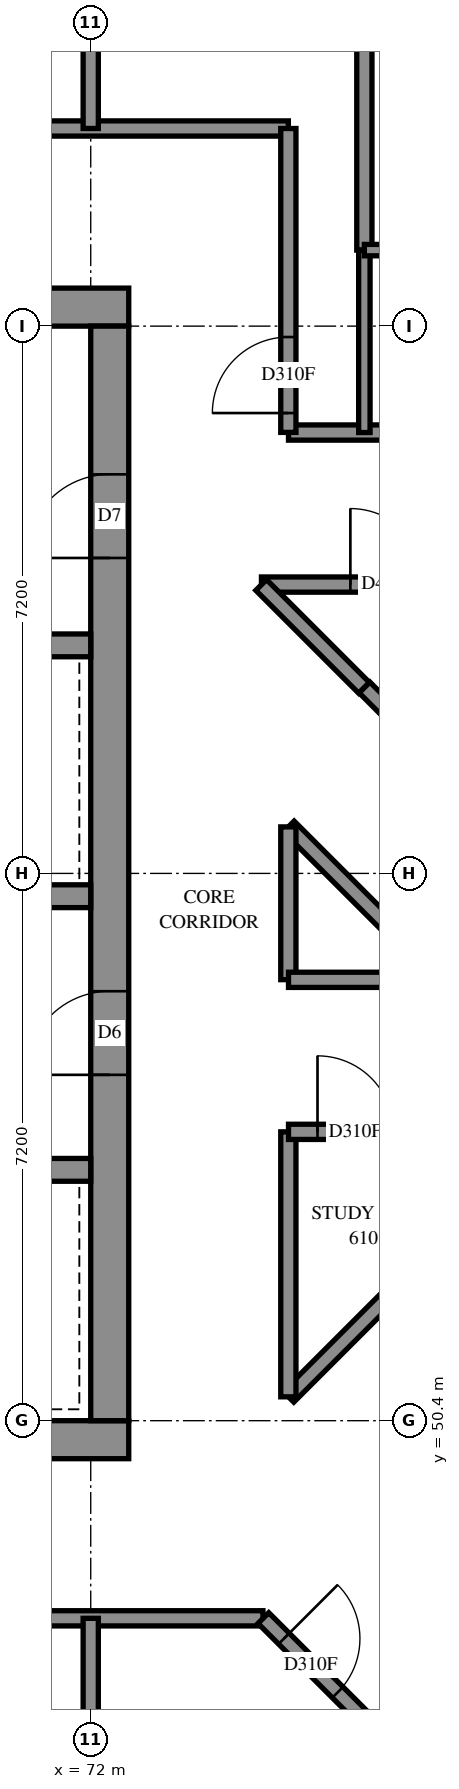
"""IFC4 building model, lengths in metres.
Left out: names, types, materials, properties, quantities, classifications, styles, units other than length and angle.
Written with IfcOpenShell. Run it as: python <this file> out.ifc"""

import sys

from ifc_helpers import new_model, si_unit, direction, frame, frame_2d, origin, place, context, subcontext, project, spatial, rectangle, extrude, element, fill, save


model = new_model("IFC4")
c1 = context("Model", 3, precision=1e-05, world=origin(), true_north=direction((0.0, 1.0)))
c2 = subcontext(c1, "Body", "Model", "MODEL_VIEW")
j1 = project(units=[si_unit("LENGTHUNIT", "METRE"), si_unit("PLANEANGLEUNIT", "RADIAN")], contexts=[c1])
p1 = place(None, origin())
s1 = spatial("IfcSite", under=j1, at=p1, CompositionType="ELEMENT")
p2 = place(p1, origin())
s2 = spatial("IfcBuilding", under=s1, at=p2, CompositionType="ELEMENT")
p3 = place(p2, frame((0.0, 0.0, 223.6)))
s3 = spatial("IfcBuildingStorey", under=s2, at=p3, CompositionType="ELEMENT", Elevation=223.6)
p4 = place(p3, frame((57.1, 50.15, -0.3), z_axis=(0.0, 0.0, 1.0), x_axis=(1.0, 0.0, 0.0)))
e1 = element("IfcWall", 1, at=p4, inside=s3, PredefinedType="SHEAR", context=c2, shape_type="SweptSolid", body=[
    extrude(rectangle(XDim=15.4, YDim=0.5, at=frame_2d((7.7, 0.0))), origin(), (0.0, 0.0, 1.0), 2.7),
])
p5 = place(p3, frame((57.1, 65.05, -0.3), z_axis=(0.0, 0.0, 1.0), x_axis=(1.0, 0.0, 0.0)))
e2 = element("IfcWall", 2, at=p5, inside=s3, PredefinedType="SHEAR", context=c2, shape_type="SweptSolid", body=[
    extrude(rectangle(XDim=15.4, YDim=0.5, at=frame_2d((7.7, 0.0))), origin(), (0.0, 0.0, 1.0), 2.7),
])
p6 = place(p5, frame((10.5, 0.0, 0.3)))
e3 = element("IfcOpeningElement", 3, at=p6, cuts=e2, PredefinedType="OPENING", context=c2, shape_type="SweptSolid", body=[
    extrude(rectangle(XDim=0.8, YDim=2.1, at=frame_2d((0.4, 1.05))), frame((0.0, 0.26, 0.0), z_axis=(0.0, -1.0, 0.0), x_axis=(1.0, 0.0, 0.0)), (0.0, 0.0, 1.0), 0.52),
])
p7 = place(p3, frame((72.25, 50.4, -0.3), z_axis=(0.0, 0.0, 1.0), x_axis=(0.0, 1.0, 0.0)))
e4 = element("IfcWall", 4, at=p7, inside=s3, PredefinedType="SHEAR", context=c2, shape_type="SweptSolid", body=[
    extrude(rectangle(XDim=14.4, YDim=0.5, at=frame_2d((7.2, 0.0))), origin(), (0.0, 0.0, 1.0), 2.7),
])
p8 = place(p7, frame((4.55, 0.0, 0.3)))
e5 = element("IfcOpeningElement", 5, at=p8, cuts=e4, PredefinedType="OPENING", context=c2, shape_type="SweptSolid", body=[
    extrude(rectangle(XDim=1.1, YDim=2.1, at=frame_2d((0.55, 1.05))), frame((0.0, 0.26, 0.0), z_axis=(0.0, -1.0, 0.0), x_axis=(1.0, 0.0, 0.0)), (0.0, 0.0, 1.0), 0.52),
])
p9 = place(p7, frame((11.35, 0.0, 0.3)))
e6 = element("IfcOpeningElement", 6, at=p9, cuts=e4, PredefinedType="OPENING", context=c2, shape_type="SweptSolid", body=[
    extrude(rectangle(XDim=1.1, YDim=2.1, at=frame_2d((0.55, 1.05))), frame((0.0, 0.26, 0.0), z_axis=(0.0, -1.0, 0.0), x_axis=(1.0, 0.0, 0.0)), (0.0, 0.0, 1.0), 0.52),
])
p10 = place(p3, frame((57.6, 53.7, 0.0), z_axis=(0.0, 0.0, 1.0), x_axis=(1.0, 0.0, 0.0)))
e7 = element("IfcWall", 7, at=p10, inside=s3, PredefinedType="SOLIDWALL", context=c2, shape_type="SweptSolid", body=[
    extrude(rectangle(XDim=14.4, YDim=0.3, at=frame_2d((7.2, 0.0))), origin(), (0.0, 0.0, 1.0), 3.1),
])
p11 = place(p10, frame((1.35, 0.0, 0.0)))
e8 = element("IfcOpeningElement", 8, at=p11, cuts=e7, PredefinedType="OPENING", context=c2, shape_type="SweptSolid", body=[
    extrude(rectangle(XDim=0.9, YDim=2.1, at=frame_2d((0.45, 1.05))), frame((0.0, 0.16, 0.0), z_axis=(0.0, -1.0, 0.0), x_axis=(1.0, 0.0, 0.0)), (0.0, 0.0, 1.0), 0.32),
])
p12 = place(p10, frame((4.95, 0.0, 0.0)))
e9 = element("IfcOpeningElement", 9, at=p12, cuts=e7, PredefinedType="OPENING", context=c2, shape_type="SweptSolid", body=[
    extrude(rectangle(XDim=0.9, YDim=2.1, at=frame_2d((0.45, 1.05))), frame((0.0, 0.16, 0.0), z_axis=(0.0, -1.0, 0.0), x_axis=(1.0, 0.0, 0.0)), (0.0, 0.0, 1.0), 0.32),
])
p13 = place(p10, frame((8.55, 0.0, 0.0)))
e10 = element("IfcOpeningElement", 10, at=p13, cuts=e7, PredefinedType="OPENING", context=c2, shape_type="SweptSolid", body=[
    extrude(rectangle(XDim=0.9, YDim=2.1, at=frame_2d((0.45, 1.05))), frame((0.0, 0.16, 0.0), z_axis=(0.0, -1.0, 0.0), x_axis=(1.0, 0.0, 0.0)), (0.0, 0.0, 1.0), 0.32),
])
p14 = place(p10, frame((12.05, 0.0, 0.0)))
e11 = element("IfcOpeningElement", 11, at=p14, cuts=e7, PredefinedType="OPENING", context=c2, shape_type="SweptSolid", body=[
    extrude(rectangle(XDim=1.1, YDim=2.1, at=frame_2d((0.55, 1.05))), frame((0.0, 0.16, 0.0), z_axis=(0.0, -1.0, 0.0), x_axis=(1.0, 0.0, 0.0)), (0.0, 0.0, 1.0), 0.32),
])
p15 = place(p3, frame((57.6, 57.3, 0.0), z_axis=(0.0, 0.0, 1.0), x_axis=(1.0, 0.0, 0.0)))
e12 = element("IfcWall", 12, at=p15, inside=s3, PredefinedType="SOLIDWALL", context=c2, shape_type="SweptSolid", body=[
    extrude(rectangle(XDim=14.4, YDim=0.3, at=frame_2d((7.2, 0.0))), origin(), (0.0, 0.0, 1.0), 3.1),
])
p16 = place(p15, frame((1.25, 0.0, 0.0)))
e13 = element("IfcOpeningElement", 13, at=p16, cuts=e12, PredefinedType="OPENING", context=c2, shape_type="SweptSolid", body=[
    extrude(rectangle(XDim=1.1, YDim=2.1, at=frame_2d((0.55, 1.05))), frame((0.0, 0.16, 0.0), z_axis=(0.0, -1.0, 0.0), x_axis=(1.0, 0.0, 0.0)), (0.0, 0.0, 1.0), 0.32),
])
p17 = place(p15, frame((4.85, 0.0, 0.0)))
e14 = element("IfcOpeningElement", 14, at=p17, cuts=e12, PredefinedType="OPENING", context=c2, shape_type="SweptSolid", body=[
    extrude(rectangle(XDim=1.1, YDim=2.1, at=frame_2d((0.55, 1.05))), frame((0.0, 0.16, 0.0), z_axis=(0.0, -1.0, 0.0), x_axis=(1.0, 0.0, 0.0)), (0.0, 0.0, 1.0), 0.32),
])
p18 = place(p15, frame((8.45, 0.0, 0.0)))
e15 = element("IfcOpeningElement", 15, at=p18, cuts=e12, PredefinedType="OPENING", context=c2, shape_type="SweptSolid", body=[
    extrude(rectangle(XDim=1.1, YDim=2.1, at=frame_2d((0.55, 1.05))), frame((0.0, 0.16, 0.0), z_axis=(0.0, -1.0, 0.0), x_axis=(1.0, 0.0, 0.0)), (0.0, 0.0, 1.0), 0.32),
])
p19 = place(p15, frame((12.05, 0.0, 0.0)))
e16 = element("IfcOpeningElement", 16, at=p19, cuts=e12, PredefinedType="OPENING", context=c2, shape_type="SweptSolid", body=[
    extrude(rectangle(XDim=1.1, YDim=2.1, at=frame_2d((0.55, 1.05))), frame((0.0, 0.16, 0.0), z_axis=(0.0, -1.0, 0.0), x_axis=(1.0, 0.0, 0.0)), (0.0, 0.0, 1.0), 0.32),
])
p20 = place(p3, frame((64.8, 60.6, 0.0), z_axis=(0.0, 0.0, 1.0), x_axis=(1.0, 0.0, 0.0)))
e17 = element("IfcWall", 17, at=p20, inside=s3, PredefinedType="SOLIDWALL", context=c2, shape_type="SweptSolid", body=[
    extrude(rectangle(XDim=7.2, YDim=0.3, at=frame_2d((3.6, 0.0))), origin(), (0.0, 0.0, 1.0), 3.1),
])
p21 = place(p3, frame((55.0, 67.4, 0.0), z_axis=(0.0, 0.0, 1.0), x_axis=(1.0, 0.0, 0.0)))
e18 = element("IfcWall", 18, at=p21, inside=s3, PredefinedType="PARTITIONING", context=c2, shape_type="SweptSolid", body=[
    extrude(rectangle(XDim=19.6, YDim=0.2, at=frame_2d((9.8, 0.0))), origin(), (0.0, 0.0, 1.0), 3.1),
])
p22 = place(p21, frame((4.9, 0.0, 0.0)))
e19 = element("IfcOpeningElement", 19, at=p22, cuts=e18, PredefinedType="OPENING", context=c2, shape_type="SweptSolid", body=[
    extrude(rectangle(XDim=0.9, YDim=2.1, at=frame_2d((0.45, 1.05))), frame((0.0, 0.11, 0.0), z_axis=(0.0, -1.0, 0.0), x_axis=(1.0, 0.0, 0.0)), (0.0, 0.0, 1.0), 0.22),
])
p23 = place(p21, frame((6.6, 0.0, 0.0)))
e20 = element("IfcOpeningElement", 20, at=p23, cuts=e18, PredefinedType="OPENING", context=c2, shape_type="SweptSolid", body=[
    extrude(rectangle(XDim=0.9, YDim=2.1, at=frame_2d((0.45, 1.05))), frame((0.0, 0.11, 0.0), z_axis=(0.0, -1.0, 0.0), x_axis=(1.0, 0.0, 0.0)), (0.0, 0.0, 1.0), 0.22),
])
p24 = place(p21, frame((14.001, 0.0, 0.0)))
e21 = element("IfcOpeningElement", 21, at=p24, cuts=e18, PredefinedType="OPENING", context=c2, shape_type="SweptSolid", body=[
    extrude(rectangle(XDim=0.9, YDim=2.1, at=frame_2d((0.45, 1.05))), frame((0.0, 0.11, 0.0), z_axis=(0.0, -1.0, 0.0), x_axis=(1.0, 0.0, 0.0)), (0.0, 0.0, 1.0), 0.22),
])
p25 = place(p3, frame((55.0, 47.8, 0.0), z_axis=(0.0, 0.0, 1.0), x_axis=(1.0, 0.0, 0.0)))
e22 = element("IfcWall", 22, at=p25, inside=s3, PredefinedType="PARTITIONING", context=c2, shape_type="SweptSolid", body=[
    extrude(rectangle(XDim=19.266, YDim=0.2, at=frame_2d((9.633, 0.0))), origin(), (0.0, 0.0, 1.0), 3.1),
])
p26 = place(p25, frame((4.9, 0.0, 0.0)))
e23 = element("IfcOpeningElement", 23, at=p26, cuts=e22, PredefinedType="OPENING", context=c2, shape_type="SweptSolid", body=[
    extrude(rectangle(XDim=0.9, YDim=2.1, at=frame_2d((0.45, 1.05))), frame((0.0, 0.11, 0.0), z_axis=(0.0, -1.0, 0.0), x_axis=(1.0, 0.0, 0.0)), (0.0, 0.0, 1.0), 0.22),
])
p27 = place(p25, frame((6.6, 0.0, 0.0)))
e24 = element("IfcOpeningElement", 24, at=p27, cuts=e22, PredefinedType="OPENING", context=c2, shape_type="SweptSolid", body=[
    extrude(rectangle(XDim=0.9, YDim=2.1, at=frame_2d((0.45, 1.05))), frame((0.0, 0.11, 0.0), z_axis=(0.0, -1.0, 0.0), x_axis=(1.0, 0.0, 0.0)), (0.0, 0.0, 1.0), 0.22),
])
p28 = place(p25, frame((13.661, 0.0, 0.0)))
e25 = element("IfcOpeningElement", 25, at=p28, cuts=e22, PredefinedType="OPENING", context=c2, shape_type="SweptSolid", body=[
    extrude(rectangle(XDim=0.9, YDim=2.1, at=frame_2d((0.45, 1.05))), frame((0.0, 0.11, 0.0), z_axis=(0.0, -1.0, 0.0), x_axis=(1.0, 0.0, 0.0)), (0.0, 0.0, 1.0), 0.22),
])
p29 = place(p3, frame((75.6, 65.8, 0.0), z_axis=(0.0, 0.0, 1.0), x_axis=(0.0, 1.0, 0.0)))
e26 = element("IfcWall", 26, at=p29, inside=s3, PredefinedType="PARTITIONING", context=c2, shape_type="SweptSolid", body=[
    extrude(rectangle(XDim=7.012, YDim=0.2, at=frame_2d((3.506, 0.0))), origin(), (0.0, 0.0, 1.0), 3.1),
])
p30 = place(p3, frame((74.246, 61.4, 0.0), z_axis=(0.0, 0.0, 1.0), x_axis=(1.0, 0.0, 0.0)))
e27 = element("IfcWall", 27, at=p30, inside=s3, PredefinedType="PARTITIONING", context=c2, shape_type="SweptSolid", body=[
    extrude(rectangle(XDim=4.954, YDim=0.2, at=frame_2d((2.477, 0.0))), origin(), (0.0, 0.0, 1.0), 3.1),
])
p31 = place(p30, frame((1.17, 0.0, 0.0)))
e28 = element("IfcOpeningElement", 28, at=p31, cuts=e27, PredefinedType="OPENING", context=c2, shape_type="SweptSolid", body=[
    extrude(rectangle(XDim=1.0, YDim=2.1, at=frame_2d((0.5, 1.05))), frame((0.0, 0.11, 0.0), z_axis=(0.0, -1.0, 0.0), x_axis=(1.0, 0.0, 0.0)), (0.0, 0.0, 1.0), 0.22),
])
p32 = place(p3, frame((74.601, 50.715, 0.0), z_axis=(0.0, 0.0, 1.0), x_axis=(0.7071067812, 0.7071067812, 0.0)))
e29 = element("IfcWall", 29, at=p32, inside=s3, PredefinedType="PARTITIONING", context=c2, shape_type="SweptSolid", body=[
    extrude(rectangle(XDim=4.927, YDim=0.2, at=frame_2d((2.464, 0.0))), origin(), (0.0, 0.0, 1.0), 3.1),
])
p33 = place(p3, frame((74.272, 47.803, 0.0), z_axis=(0.0, 0.0, 1.0), x_axis=(0.7071067812, -0.7071067812, 0.0)))
e30 = element("IfcWall", 30, at=p33, inside=s3, PredefinedType="PARTITIONING", context=c2, shape_type="SweptSolid", body=[
    extrude(rectangle(XDim=4.641, YDim=0.2, at=frame_2d((2.321, 0.0))), origin(), (0.0, 0.0, 1.0), 3.1),
])
p34 = place(p33, frame((0.382, 0.0, 0.0)))
e31 = element("IfcOpeningElement", 31, at=p34, cuts=e30, PredefinedType="OPENING", context=c2, shape_type="SweptSolid", body=[
    extrude(rectangle(XDim=1.0, YDim=2.1, at=frame_2d((0.5, 1.05))), frame((0.0, 0.11, 0.0), z_axis=(0.0, -1.0, 0.0), x_axis=(1.0, 0.0, 0.0)), (0.0, 0.0, 1.0), 0.22),
])
p35 = place(p3, frame((74.602, 63.4, 0.0), z_axis=(0.0, 0.0, 1.0), x_axis=(1.0, 0.0, 0.0)))
e32 = element("IfcWall", 32, at=p35, inside=s3, PredefinedType="PARTITIONING", context=c2, shape_type="SweptSolid", body=[
    extrude(rectangle(XDim=4.598, YDim=0.2, at=frame_2d((2.299, 0.0))), origin(), (0.0, 0.0, 1.0), 3.1),
])
p36 = place(p35, frame((3.298, 0.0, 0.0)))
e33 = element("IfcOpeningElement", 33, at=p36, cuts=e32, PredefinedType="OPENING", context=c2, shape_type="SweptSolid", body=[
    extrude(rectangle(XDim=0.9, YDim=2.1, at=frame_2d((0.45, 1.05))), frame((0.0, 0.11, 0.0), z_axis=(0.0, -1.0, 0.0), x_axis=(1.0, 0.0, 0.0)), (0.0, 0.0, 1.0), 0.22),
])
p37 = place(p3, frame((72.0, 43.6, 0.0), z_axis=(0.0, 0.0, 1.0), x_axis=(0.0, 1.0, 0.0)))
e34 = element("IfcWall", 34, at=p37, inside=s3, PredefinedType="PARTITIONING", context=c2, shape_type="SweptSolid", body=[
    extrude(rectangle(XDim=4.2, YDim=0.2, at=frame_2d((2.1, 0.0))), origin(), (0.0, 0.0, 1.0), 3.1),
])
p38 = place(p3, frame((72.0, 67.4, 0.0), z_axis=(0.0, 0.0, 1.0), x_axis=(0.0, 1.0, 0.0)))
e35 = element("IfcWall", 35, at=p38, inside=s3, PredefinedType="PARTITIONING", context=c2, shape_type="SweptSolid", body=[
    extrude(rectangle(XDim=4.096, YDim=0.2, at=frame_2d((2.048, 0.0))), origin(), (0.0, 0.0, 1.0), 3.1),
])
p39 = place(p3, frame((74.6, 63.402, 0.0), z_axis=(0.0, 0.0, 1.0), x_axis=(0.0, 1.0, 0.0)))
e36 = element("IfcWall", 36, at=p39, inside=s3, PredefinedType="PARTITIONING", context=c2, shape_type="SweptSolid", body=[
    extrude(rectangle(XDim=3.998, YDim=0.2, at=frame_2d((1.999, 0.0))), origin(), (0.0, 0.0, 1.0), 3.1),
])
p40 = place(p39, frame((0.255, 0.0, 0.0)))
e37 = element("IfcOpeningElement", 37, at=p40, cuts=e36, PredefinedType="OPENING", context=c2, shape_type="SweptSolid", body=[
    extrude(rectangle(XDim=1.0, YDim=2.1, at=frame_2d((0.5, 1.05))), frame((0.0, 0.11, 0.0), z_axis=(0.0, -1.0, 0.0), x_axis=(1.0, 0.0, 0.0)), (0.0, 0.0, 1.0), 0.22),
])
p41 = place(p3, frame((74.6, 50.714, 0.0), z_axis=(0.0, 0.0, 1.0), x_axis=(0.0, 1.0, 0.0)))
e38 = element("IfcWall", 38, at=p41, inside=s3, PredefinedType="PARTITIONING", context=c2, shape_type="SweptSolid", body=[
    extrude(rectangle(XDim=3.486, YDim=0.2, at=frame_2d((1.743, 0.0))), origin(), (0.0, 0.0, 1.0), 3.1),
])
p42 = place(p3, frame((74.602, 54.2, 0.0), z_axis=(0.0, 0.0, 1.0), x_axis=(1.0, 0.0, 0.0)))
e39 = element("IfcWall", 39, at=p42, inside=s3, PredefinedType="PARTITIONING", context=c2, shape_type="SweptSolid", body=[
    extrude(rectangle(XDim=3.484, YDim=0.2, at=frame_2d((1.742, 0.0))), origin(), (0.0, 0.0, 1.0), 3.1),
])
p43 = place(p42, frame((0.382, 0.0, 0.0)))
e40 = element("IfcOpeningElement", 40, at=p43, cuts=e39, PredefinedType="OPENING", context=c2, shape_type="SweptSolid", body=[
    extrude(rectangle(XDim=1.0, YDim=2.1, at=frame_2d((0.5, 1.05))), frame((0.0, 0.11, 0.0), z_axis=(0.0, -1.0, 0.0), x_axis=(1.0, 0.0, 0.0)), (0.0, 0.0, 1.0), 0.22),
])
p44 = place(p3, frame((74.606, 58.218, 0.0), z_axis=(0.0, 0.0, 1.0), x_axis=(0.7071067812, -0.7071067812, 0.0)))
e41 = element("IfcWall", 41, at=p44, inside=s3, PredefinedType="PARTITIONING", context=c2, shape_type="SweptSolid", body=[
    extrude(rectangle(XDim=2.845, YDim=0.2, at=frame_2d((1.423, 0.0))), origin(), (0.0, 0.0, 1.0), 3.1),
])
p45 = place(p3, frame((75.6, 63.4, 0.0), z_axis=(0.0, 0.0, 1.0), x_axis=(0.0, 1.0, 0.0)))
e42 = element("IfcWall", 42, at=p45, inside=s3, PredefinedType="PARTITIONING", context=c2, shape_type="SweptSolid", body=[
    extrude(rectangle(XDim=2.4, YDim=0.15, at=frame_2d((1.2, 0.0))), origin(), (0.0, 0.0, 1.0), 3.1),
])
for number, where, z_axis, x_axis in (
    (43, (74.6, 56.202, 0.0), (0.0, 0.0, 1.0), (0.0, 1.0, 0.0)),
    (44, (74.602, 56.2, 0.0), (0.0, 0.0, 1.0), (1.0, 0.0, 0.0)),
):
    element("IfcWall", number, at=place(p3, frame(where, z_axis=z_axis, x_axis=x_axis)), inside=s3, PredefinedType="PARTITIONING", context=c2, shape_type="SweptSolid", body=[
        extrude(rectangle(XDim=2.01, YDim=0.2, at=frame_2d((1.005, 0.0))), origin(), (0.0, 0.0, 1.0), 3.1),
    ])
p46 = place(p3, frame((74.243, 61.395, 0.0), z_axis=(0.0, 0.0, 1.0), x_axis=(0.7071067812, -0.7071067812, 0.0)))
e45 = element("IfcWall", 45, at=p46, inside=s3, PredefinedType="PARTITIONING", context=c2, shape_type="SweptSolid", body=[
    extrude(rectangle(XDim=1.915, YDim=0.2, at=frame_2d((0.957, 0.0))), origin(), (0.0, 0.0, 1.0), 3.1),
])
p47 = place(p3, frame((75.6, 65.8, 0.0), z_axis=(0.0, 0.0, 1.0), x_axis=(1.0, 0.0, 0.0)))
e46 = element("IfcWall", 46, at=p47, inside=s3, PredefinedType="PARTITIONING", context=c2, shape_type="SweptSolid", body=[
    extrude(rectangle(XDim=1.9, YDim=0.15, at=frame_2d((0.95, 0.0))), origin(), (0.0, 0.0, 1.0), 3.1),
])
p48 = place(p47, frame((0.607, 0.0, 0.0)))
e47 = element("IfcOpeningElement", 47, at=p48, cuts=e46, PredefinedType="OPENING", context=c2, shape_type="SweptSolid", body=[
    extrude(rectangle(XDim=0.8, YDim=2.1, at=frame_2d((0.4, 1.05))), frame((0.0, 0.085, 0.0), z_axis=(0.0, -1.0, 0.0), x_axis=(1.0, 0.0, 0.0)), (0.0, 0.0, 1.0), 0.17),
])
p49 = place(p3, frame((75.602, 60.046, 0.0), z_axis=(0.0, 0.0, 1.0), x_axis=(0.7063318703, -0.7078808437, 0.0)))
e48 = element("IfcWall", 48, at=p49, inside=s3, PredefinedType="PARTITIONING", context=c2, shape_type="SweptSolid", body=[
    extrude(rectangle(XDim=1.291, YDim=0.2, at=frame_2d((0.646, 0.0))), origin(), (0.0, 0.0, 1.0), 3.1),
])
p50 = place(p8, origin())
e49 = element("IfcDoor", 49, at=p50, inside=s3, OperationType="DOUBLE_DOOR_SINGLE_SWING", PredefinedType="DOOR", context=c2, shape_type="SweptSolid", body=[
    extrude(rectangle(XDim=1.1, YDim=2.1, at=frame_2d((0.55, 1.05))), frame((0.0, 0.025, 0.0), z_axis=(0.0, -1.0, 0.0), x_axis=(1.0, 0.0, 0.0)), (0.0, 0.0, 1.0), 0.05),
])
fill(e5, e49)
p51 = place(p9, origin())
e50 = element("IfcDoor", 50, at=p51, inside=s3, OperationType="SINGLE_SWING_RIGHT", PredefinedType="DOOR", context=c2, shape_type="SweptSolid", body=[
    extrude(rectangle(XDim=1.1, YDim=2.1, at=frame_2d((0.55, 1.05))), frame((0.0, 0.025, 0.0), z_axis=(0.0, -1.0, 0.0), x_axis=(1.0, 0.0, 0.0)), (0.0, 0.0, 1.0), 0.05),
])
fill(e6, e50)
p52 = place(p43, origin())
e51 = element("IfcDoor", 51, at=p52, inside=s3, OperationType="SINGLE_SWING_RIGHT", PredefinedType="DOOR", context=c2, shape_type="SweptSolid", body=[
    extrude(rectangle(XDim=1.0, YDim=2.1, at=frame_2d((0.5, 1.05))), frame((0.0, 0.025, 0.0), z_axis=(0.0, -1.0, 0.0), x_axis=(1.0, 0.0, 0.0)), (0.0, 0.0, 1.0), 0.05),
])
fill(e40, e51)
p53 = place(p40, origin())
e52 = element("IfcDoor", 52, at=p53, inside=s3, OperationType="SINGLE_SWING_RIGHT", PredefinedType="DOOR", context=c2, shape_type="SweptSolid", body=[
    extrude(rectangle(XDim=1.0, YDim=2.1, at=frame_2d((0.5, 1.05))), frame((0.0, 0.025, 0.0), z_axis=(0.0, -1.0, 0.0), x_axis=(1.0, 0.0, 0.0)), (0.0, 0.0, 1.0), 0.05),
])
fill(e37, e52)
p54 = place(p34, origin())
e53 = element("IfcDoor", 53, at=p54, inside=s3, OperationType="SINGLE_SWING_LEFT", PredefinedType="DOOR", context=c2, shape_type="SweptSolid", body=[
    extrude(rectangle(XDim=1.0, YDim=2.1, at=frame_2d((0.5, 1.05))), frame((0.0, 0.025, 0.0), z_axis=(0.0, -1.0, 0.0), x_axis=(1.0, 0.0, 0.0)), (0.0, 0.0, 1.0), 0.05),
])
fill(e31, e53)
p55 = place(p31, origin())
e54 = element("IfcDoor", 54, at=p55, inside=s3, OperationType="SINGLE_SWING_RIGHT", PredefinedType="DOOR", context=c2, shape_type="SweptSolid", body=[
    extrude(rectangle(XDim=1.0, YDim=2.1, at=frame_2d((0.5, 1.05))), frame((0.0, 0.025, 0.0), z_axis=(0.0, -1.0, 0.0), x_axis=(1.0, 0.0, 0.0)), (0.0, 0.0, 1.0), 0.05),
])
fill(e28, e54)
save(model, sys.argv[1])
